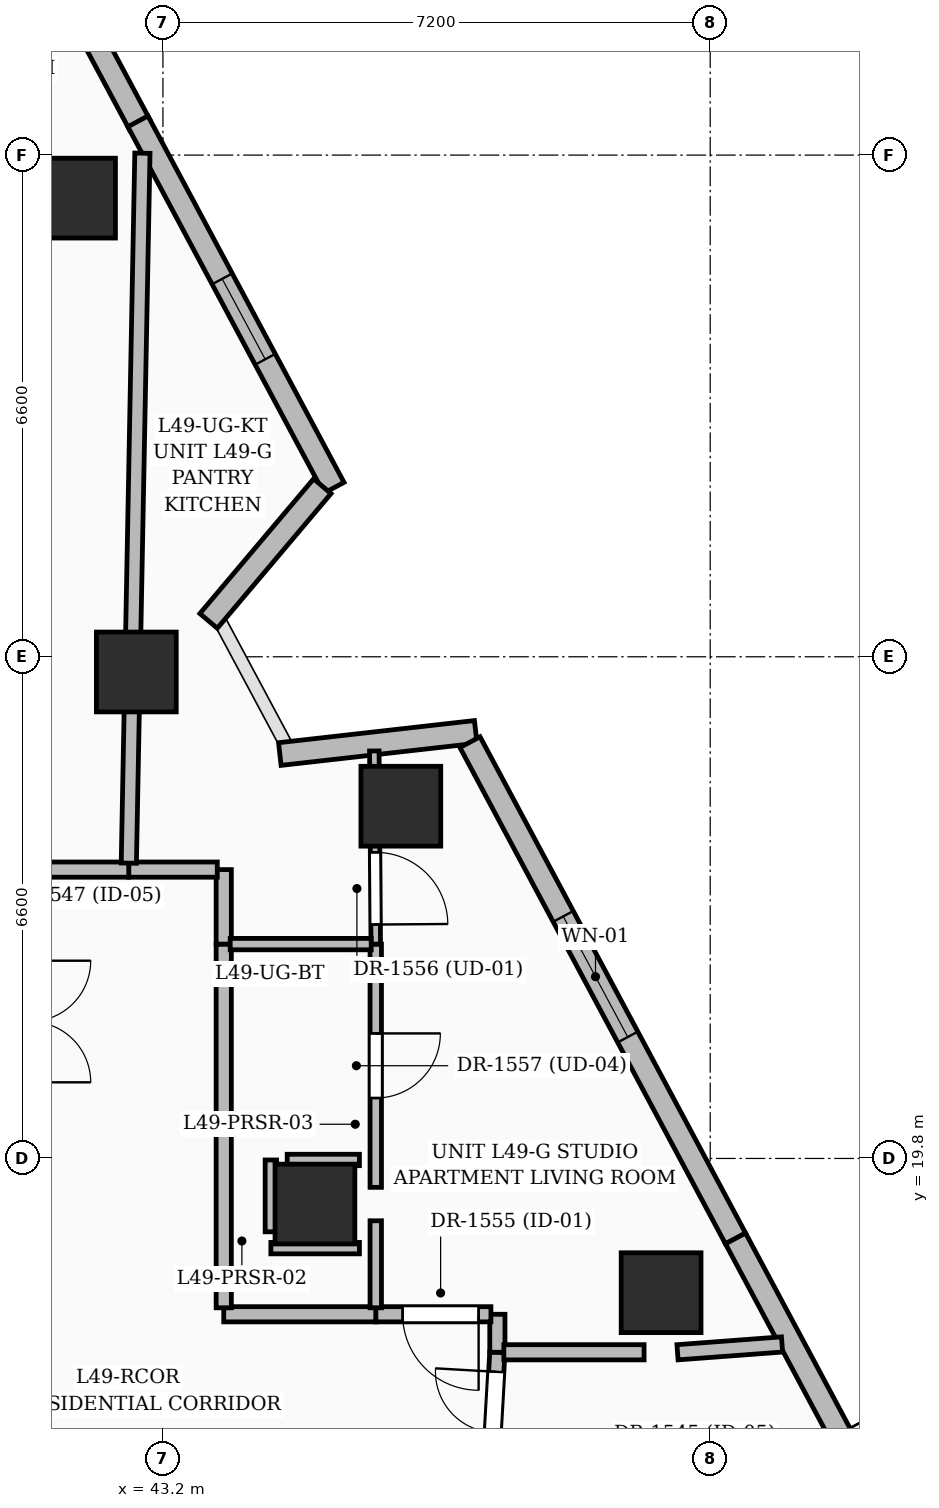
"""IFC4 building model, lengths in metres.
Left out: names, types, materials, properties, quantities, classifications, styles, units other than length and angle.
Written with IfcOpenShell. Run it as: python <this file> out.ifc"""

import sys

from ifc_helpers import new_model, si_unit, direction, frame, frame_2d, origin, origin_2d, place, context, subcontext, project, spatial, rectangle, extrude, element, fill, save


model = new_model("IFC4")
c1 = context("Model", 3, precision=1e-05, world=origin(), true_north=direction((0.0, 1.0)))
c2 = subcontext(c1, "Body", "Model", "MODEL_VIEW")
j1 = project(units=[si_unit("LENGTHUNIT", "METRE"), si_unit("PLANEANGLEUNIT", "RADIAN")], contexts=[c1])
p1 = place(None, origin())
s1 = spatial("IfcSite", under=j1, at=p1, CompositionType="ELEMENT")
p2 = place(p1, origin())
s2 = spatial("IfcBuilding", under=s1, at=p2, CompositionType="ELEMENT")
p3 = place(p2, frame((0.0, 0.0, 189.6)))
s3 = spatial("IfcBuildingStorey", under=s2, at=p3, CompositionType="ELEMENT", Elevation=189.6)
for number, where, z_axis, x_axis in (
    (1, (45.2, 19.2, 0.0), (0.0, 0.0, 1.0), (1.0, 0.0, 0.0)),
    (2, (42.85, 26.2, 0.0), (0.0, 0.0, 1.0), (1.0, 0.0, 0.0)),
    (3, (49.754, 18.034, 0.0), (0.0, 0.0, 1.0), (1.0, 0.0, 0.0)),
    (4, (46.33, 24.434, 0.0), (0.0, 0.0, 1.0), (1.0, 0.0, 0.0)),
    (5, (42.05, 32.434, 0.0), (0.0, 0.0, 1.0), (1.0, 0.0, 0.0)),
):
    element("IfcColumn", number, at=place(p3, frame(where, z_axis=z_axis, x_axis=x_axis)), inside=s3, PredefinedType="COLUMN", context=c2, shape_type="SweptSolid", body=[
        extrude(rectangle(XDim=1.05, YDim=1.05, at=origin_2d()), origin(), (0.0, 0.0, 1.0), 3.6),
    ])
p4 = place(p3, frame((40.497, 37.881, 0.0), z_axis=(0.0, 0.0, 1.0), x_axis=(0.471779002276, -0.881716832669, 0.0)))
e6 = element("IfcWall", 6, at=p4, inside=s3, PredefinedType="SOLIDWALL", context=c2, shape_type="SweptSolid", body=[
    extrude(rectangle(XDim=5.085, YDim=0.3, at=frame_2d((2.542, 0.0))), origin(), (0.0, 0.0, 1.0), 3.35),
])
p5 = place(p4, frame((1.815, 0.0, 0.6)))
e7 = element("IfcOpeningElement", 7, at=p5, cuts=e6, PredefinedType="OPENING", context=c2, shape_type="SweptSolid", body=[
    extrude(rectangle(XDim=1.5, YDim=2.1, at=frame_2d((0.75, 1.05))), frame((0.0, 0.16, 0.0), z_axis=(0.0, -1.0, 0.0), x_axis=(1.0, 0.0, 0.0)), (0.0, 0.0, 1.0), 0.32),
])
p6 = place(p3, frame((42.871, 33.444, 0.0), z_axis=(0.0, 0.0, 1.0), x_axis=(0.4717652995, -0.881724164457, 0.0)))
e8 = element("IfcWall", 8, at=p6, inside=s3, PredefinedType="SOLIDWALL", context=c2, shape_type="SweptSolid", body=[
    extrude(rectangle(XDim=5.467, YDim=0.3, at=frame_2d((2.733, 0.0))), origin(), (0.0, 0.0, 1.0), 3.35),
])
p7 = place(p6, frame((2.35, 0.0, 0.8)))
e9 = element("IfcOpeningElement", 9, at=p7, cuts=e8, PredefinedType="OPENING", context=c2, shape_type="SweptSolid", body=[
    extrude(rectangle(XDim=1.2, YDim=1.8, at=frame_2d((0.6, 0.9))), frame((0.0, 0.16, 0.0), z_axis=(0.0, -1.0, 0.0), x_axis=(1.0, 0.0, 0.0)), (0.0, 0.0, 1.0), 0.32),
])
p8 = place(p3, frame((45.297, 28.644, 0.0), z_axis=(0.0, 0.0, 1.0), x_axis=(-0.645172623399, -0.76403683551, 0.0)))
e10 = element("IfcWall", 10, at=p8, inside=s3, PredefinedType="SOLIDWALL", context=c2, shape_type="SweptSolid", body=[
    extrude(rectangle(XDim=2.319, YDim=0.3, at=frame_2d((1.159, 0.0))), origin(), (0.0, 0.0, 1.0), 2.575),
])
p9 = place(p3, frame((44.738, 25.12, 0.0), z_axis=(0.0, 0.0, 1.0), x_axis=(0.993675379704, 0.112290871269, 0.0)))
e11 = element("IfcWall", 11, at=p9, inside=s3, PredefinedType="SOLIDWALL", context=c2, shape_type="SweptSolid", body=[
    extrude(rectangle(XDim=2.594, YDim=0.3, at=frame_2d((1.297, 0.0))), origin(), (0.0, 0.0, 1.0), 2.575),
])
p10 = place(p3, frame((47.24, 25.277, 0.0), z_axis=(0.0, 0.0, 1.0), x_axis=(0.471730943247, -0.881742545862, 0.0)))
e12 = element("IfcWall", 12, at=p10, inside=s3, PredefinedType="SOLIDWALL", context=c2, shape_type="SweptSolid", body=[
    extrude(rectangle(XDim=7.405, YDim=0.3, at=frame_2d((3.703, 0.0))), origin(), (0.0, 0.0, 1.0), 3.35),
])
p11 = place(p10, frame((2.6, 0.0, 0.6)))
e13 = element("IfcOpeningElement", 13, at=p11, cuts=e12, PredefinedType="OPENING", context=c2, shape_type="SweptSolid", body=[
    extrude(rectangle(XDim=1.8, YDim=2.1, at=frame_2d((0.9, 1.05))), frame((0.0, 0.16, 0.0), z_axis=(0.0, -1.0, 0.0), x_axis=(1.0, 0.0, 0.0)), (0.0, 0.0, 1.0), 0.32),
])
p12 = place(p3, frame((50.733, 18.748, 0.0), z_axis=(0.0, 0.0, 1.0), x_axis=(0.471736169991, -0.881739749542, 0.0)))
e14 = element("IfcWall", 14, at=p12, inside=s3, PredefinedType="SOLIDWALL", context=c2, shape_type="SweptSolid", body=[
    extrude(rectangle(XDim=7.68, YDim=0.3, at=frame_2d((3.84, 0.0))), origin(), (0.0, 0.0, 1.0), 3.35),
])
p13 = place(p12, frame((5.09, 0.0, 0.0)))
e15 = element("IfcOpeningElement", 15, at=p13, cuts=e14, PredefinedType="OPENING", context=c2, shape_type="SweptSolid", body=[
    extrude(rectangle(XDim=1.0, YDim=2.2, at=frame_2d((0.5, 1.1))), frame((0.0, 0.16, 0.0), z_axis=(0.0, -1.0, 0.0), x_axis=(1.0, 0.0, 0.0)), (0.0, 0.0, 1.0), 0.32),
])
p14 = place(p3, frame((47.425, 14.2, 0.0), z_axis=(0.0, 0.0, 1.0), x_axis=(0.057297851692, 0.998357128582, 0.0)))
e16 = element("IfcWall", 16, at=p14, inside=s3, PredefinedType="PARTITIONING", context=c2, shape_type="SweptSolid", body=[
    extrude(rectangle(XDim=3.055, YDim=0.2, at=frame_2d((1.528, 0.0))), origin(), (0.0, 0.0, 1.0), 2.464),
])
p15 = place(p14, frame((1.198, 0.0, 0.0)))
e17 = element("IfcOpeningElement", 17, at=p15, cuts=e16, PredefinedType="OPENING", context=c2, shape_type="SweptSolid", body=[
    extrude(rectangle(XDim=1.6, YDim=2.3, at=frame_2d((0.8, 1.15))), frame((0.0, 0.11, 0.0), z_axis=(0.0, -1.0, 0.0), x_axis=(1.0, 0.0, 0.0)), (0.0, 0.0, 1.0), 0.22),
])
p16 = place(p3, frame((47.6, 17.25, 0.0), z_axis=(0.0, 0.0, 1.0), x_axis=(0.0, 1.0, 0.0)))
e18 = element("IfcWall", 18, at=p16, inside=s3, PredefinedType="PARTITIONING", context=c2, shape_type="SweptSolid", body=[
    extrude(rectangle(XDim=0.5, YDim=0.2, at=frame_2d((0.25, 0.0))), origin(), (0.0, 0.0, 1.0), 3.35),
])
p17 = place(p3, frame((47.515, 17.75, 0.0), z_axis=(0.0, 0.0, 1.0), x_axis=(-1.0, 0.0, 0.0)))
e19 = element("IfcWall", 19, at=p17, inside=s3, PredefinedType="PARTITIONING", context=c2, shape_type="SweptSolid", body=[
    extrude(rectangle(XDim=1.515, YDim=0.2, at=frame_2d((0.757, 0.0))), origin(), (0.0, 0.0, 1.0), 2.436),
])
p18 = place(p17, frame((0.162, 0.0, 0.0)))
e20 = element("IfcOpeningElement", 20, at=p18, cuts=e19, PredefinedType="OPENING", context=c2, shape_type="SweptSolid", body=[
    extrude(rectangle(XDim=1.0, YDim=2.2, at=frame_2d((0.5, 1.1))), frame((0.0, 0.11, 0.0), z_axis=(0.0, -1.0, 0.0), x_axis=(1.0, 0.0, 0.0)), (0.0, 0.0, 1.0), 0.22),
])
p19 = place(p3, frame((46.0, 17.75, 0.0), z_axis=(0.0, 0.0, 1.0), x_axis=(-1.0, 0.0, 0.0)))
e21 = element("IfcWall", 21, at=p19, inside=s3, PredefinedType="PARTITIONING", context=c2, shape_type="SweptSolid", body=[
    extrude(rectangle(XDim=2.0, YDim=0.2, at=frame_2d((1.0, 0.0))), origin(), (0.0, 0.0, 1.0), 2.436),
])
p20 = place(p3, frame((44.0, 17.835, 0.0), z_axis=(0.0, 0.0, 1.0), x_axis=(0.0, 1.0, 0.0)))
e22 = element("IfcWall", 22, at=p20, inside=s3, PredefinedType="PARTITIONING", context=c2, shape_type="SweptSolid", body=[
    extrude(rectangle(XDim=4.785, YDim=0.2, at=frame_2d((2.393, 0.0))), origin(), (0.0, 0.0, 1.0), 2.436),
])
p21 = place(p3, frame((44.0, 22.62, 0.0), z_axis=(0.0, 0.0, 1.0), x_axis=(0.0, 1.0, 0.0)))
e23 = element("IfcWall", 23, at=p21, inside=s3, PredefinedType="PARTITIONING", context=c2, shape_type="SweptSolid", body=[
    extrude(rectangle(XDim=0.98, YDim=0.2, at=frame_2d((0.49, 0.0))), origin(), (0.0, 0.0, 1.0), 2.436),
])
p22 = place(p3, frame((43.915, 23.6, 0.0), z_axis=(0.0, 0.0, 1.0), x_axis=(-1.0, 0.0, 0.0)))
e24 = element("IfcWall", 24, at=p22, inside=s3, PredefinedType="PARTITIONING", context=c2, shape_type="SweptSolid", body=[
    extrude(rectangle(XDim=1.165, YDim=0.2, at=frame_2d((0.583, 0.0))), origin(), (0.0, 0.0, 1.0), 2.436),
])
p23 = place(p3, frame((42.75, 23.6, 0.0), z_axis=(0.0, 0.0, 1.0), x_axis=(-1.0, 0.0, 0.0)))
e25 = element("IfcWall", 25, at=p23, inside=s3, PredefinedType="PARTITIONING", context=c2, shape_type="SweptSolid", body=[
    extrude(rectangle(XDim=1.3, YDim=0.2, at=frame_2d((0.65, 0.0))), origin(), (0.0, 0.0, 1.0), 3.35),
])
p24 = place(p3, frame((49.53, 17.25, 0.0), z_axis=(0.0, 0.0, 1.0), x_axis=(-1.0, 0.0, 0.0)))
e26 = element("IfcWall", 26, at=p24, inside=s3, PredefinedType="PARTITIONING", context=c2, shape_type="SweptSolid", body=[
    extrude(rectangle(XDim=1.845, YDim=0.2, at=frame_2d((0.922, 0.0))), origin(), (0.0, 0.0, 1.0), 2.464),
])
p25 = place(p3, frame((51.345, 17.353, 0.0), z_axis=(0.0, 0.0, 1.0), x_axis=(-0.997204589504, -0.074719520023, 0.0)))
e27 = element("IfcWall", 27, at=p25, inside=s3, PredefinedType="PARTITIONING", context=c2, shape_type="SweptSolid", body=[
    extrude(rectangle(XDim=1.379, YDim=0.2, at=frame_2d((0.689, 0.0))), origin(), (0.0, 0.0, 1.0), 2.57),
])
p26 = place(p3, frame((46.0, 18.98, 0.0), z_axis=(0.0, 0.0, 1.0), x_axis=(0.0, -1.0, 0.0)))
e28 = element("IfcWall", 28, at=p26, inside=s3, PredefinedType="PARTITIONING", context=c2, shape_type="SweptSolid", body=[
    extrude(rectangle(XDim=1.145, YDim=0.15, at=frame_2d((0.573, 0.0))), origin(), (0.0, 0.0, 1.0), 2.436),
])
p27 = place(p3, frame((46.0, 22.62, 0.0), z_axis=(0.0, 0.0, 1.0), x_axis=(0.0, -1.0, 0.0)))
e29 = element("IfcWall", 29, at=p27, inside=s3, PredefinedType="PARTITIONING", context=c2, shape_type="SweptSolid", body=[
    extrude(rectangle(XDim=3.2, YDim=0.15, at=frame_2d((1.6, 0.0))), origin(), (0.0, 0.0, 1.0), 2.464),
])
p28 = place(p27, frame((1.175, 0.0, 0.0)))
e30 = element("IfcOpeningElement", 30, at=p28, cuts=e29, PredefinedType="OPENING", context=c2, shape_type="SweptSolid", body=[
    extrude(rectangle(XDim=0.85, YDim=2.1, at=frame_2d((0.425, 1.05))), frame((0.0, 0.085, 0.0), z_axis=(0.0, -1.0, 0.0), x_axis=(1.0, 0.0, 0.0)), (0.0, 0.0, 1.0), 0.17),
])
p29 = place(p3, frame((45.981, 25.161, 0.0), z_axis=(0.0, 0.0, 1.0), x_axis=(0.007494744815, -0.999971914006, 0.0)))
e31 = element("IfcWall", 31, at=p29, inside=s3, PredefinedType="PARTITIONING", context=c2, shape_type="SweptSolid", body=[
    extrude(rectangle(XDim=2.541, YDim=0.125, at=frame_2d((1.271, 0.0))), origin(), (0.0, 0.0, 1.0), 2.464),
])
p30 = place(p29, frame((1.334, 0.0, 0.0)))
e32 = element("IfcOpeningElement", 32, at=p30, cuts=e31, PredefinedType="OPENING", context=c2, shape_type="SweptSolid", body=[
    extrude(rectangle(XDim=0.95, YDim=2.2, at=frame_2d((0.475, 1.1))), frame((0.0, 0.072, 0.0), z_axis=(0.0, -1.0, 0.0), x_axis=(1.0, 0.0, 0.0)), (0.0, 0.0, 1.0), 0.145),
])
p31 = place(p3, frame((45.94, 22.62, 0.0), z_axis=(0.0, 0.0, 1.0), x_axis=(-1.0, 0.0, 0.0)))
e33 = element("IfcWall", 33, at=p31, inside=s3, PredefinedType="PARTITIONING", context=c2, shape_type="SweptSolid", body=[
    extrude(rectangle(XDim=1.855, YDim=0.15, at=frame_2d((0.927, 0.0))), origin(), (0.0, 0.0, 1.0), 2.436),
])
p32 = place(p3, frame((42.93, 33.025, 0.0), z_axis=(0.0, 0.0, 1.0), x_axis=(-0.019130751699, -0.999816990423, 0.0)))
e34 = element("IfcWall", 34, at=p32, inside=s3, PredefinedType="PARTITIONING", context=c2, shape_type="SweptSolid", body=[
    extrude(rectangle(XDim=9.342, YDim=0.2, at=frame_2d((4.671, 0.0))), origin(), (0.0, 0.0, 1.0), 2.436),
])
p33 = place(p3, frame((45.785, 18.62, 0.0), z_axis=(0.0, 0.0, 1.0), x_axis=(-1.0, 0.0, 0.0)))
e35 = element("IfcWall", 35, at=p33, inside=s3, PredefinedType="PARTITIONING", context=c2, shape_type="SweptSolid", body=[
    extrude(rectangle(XDim=1.165, YDim=0.15, at=frame_2d((0.583, 0.0))), origin(), (0.0, 0.0, 1.0), 2.436),
])
p34 = place(p3, frame((44.62, 18.835, 0.0), z_axis=(0.0, 0.0, 1.0), x_axis=(0.0, 1.0, 0.0)))
e36 = element("IfcWall", 36, at=p34, inside=s3, PredefinedType="PARTITIONING", context=c2, shape_type="SweptSolid", body=[
    extrude(rectangle(XDim=0.945, YDim=0.15, at=frame_2d((0.473, 0.0))), origin(), (0.0, 0.0, 1.0), 2.853),
])
p35 = place(p3, frame((44.835, 19.78, 0.0), z_axis=(0.0, 0.0, 1.0), x_axis=(1.0, 0.0, 0.0)))
e37 = element("IfcWall", 37, at=p35, inside=s3, PredefinedType="PARTITIONING", context=c2, shape_type="SweptSolid", body=[
    extrude(rectangle(XDim=0.95, YDim=0.15, at=frame_2d((0.475, 0.0))), origin(), (0.0, 0.0, 1.0), 2.436),
])
p36 = place(p7, origin())
e38 = element("IfcWindow", 38, at=p36, inside=s3, PartitioningType="SINGLE_PANEL", PredefinedType="WINDOW", context=c2, shape_type="SweptSolid", body=[
    extrude(rectangle(XDim=1.2, YDim=1.8, at=frame_2d((0.6, 0.9))), frame((0.0, 0.03, 0.0), z_axis=(0.0, -1.0, 0.0), x_axis=(1.0, 0.0, 0.0)), (0.0, 0.0, 1.0), 0.06),
])
fill(e9, e38)
p37 = place(p11, origin())
e39 = element("IfcWindow", 39, at=p37, inside=s3, PartitioningType="SINGLE_PANEL", PredefinedType="WINDOW", context=c2, shape_type="SweptSolid", body=[
    extrude(rectangle(XDim=1.8, YDim=2.1, at=frame_2d((0.9, 1.05))), frame((0.0, 0.03, 0.0), z_axis=(0.0, -1.0, 0.0), x_axis=(1.0, 0.0, 0.0)), (0.0, 0.0, 1.0), 0.06),
])
fill(e13, e39)
p38 = place(p15, origin())
e40 = element("IfcDoor", 40, at=p38, inside=s3, OperationType="DOUBLE_DOOR_SINGLE_SWING", PredefinedType="DOOR", context=c2, shape_type="SweptSolid", body=[
    extrude(rectangle(XDim=1.6, YDim=2.3, at=frame_2d((0.8, 1.15))), frame((0.0, 0.025, 0.0), z_axis=(0.0, -1.0, 0.0), x_axis=(1.0, 0.0, 0.0)), (0.0, 0.0, 1.0), 0.05),
])
fill(e17, e40)
p39 = place(p18, origin())
e41 = element("IfcDoor", 41, at=p39, inside=s3, OperationType="SINGLE_SWING_LEFT", PredefinedType="DOOR", context=c2, shape_type="SweptSolid", body=[
    extrude(rectangle(XDim=1.0, YDim=2.2, at=frame_2d((0.5, 1.1))), frame((0.0, 0.025, 0.0), z_axis=(0.0, -1.0, 0.0), x_axis=(1.0, 0.0, 0.0)), (0.0, 0.0, 1.0), 0.05),
])
fill(e20, e41)
p40 = place(p30, origin())
e42 = element("IfcDoor", 42, at=p40, inside=s3, OperationType="SINGLE_SWING_RIGHT", PredefinedType="DOOR", context=c2, shape_type="SweptSolid", body=[
    extrude(rectangle(XDim=0.95, YDim=2.2, at=frame_2d((0.475, 1.1))), frame((0.0, 0.025, 0.0), z_axis=(0.0, -1.0, 0.0), x_axis=(1.0, 0.0, 0.0)), (0.0, 0.0, 1.0), 0.05),
])
fill(e32, e42)
p41 = place(p28, origin())
e43 = element("IfcDoor", 43, at=p41, inside=s3, OperationType="SINGLE_SWING_LEFT", PredefinedType="DOOR", context=c2, shape_type="SweptSolid", body=[
    extrude(rectangle(XDim=0.85, YDim=2.1, at=frame_2d((0.425, 1.05))), frame((0.0, 0.025, 0.0), z_axis=(0.0, -1.0, 0.0), x_axis=(1.0, 0.0, 0.0)), (0.0, 0.0, 1.0), 0.05),
])
fill(e30, e43)
save(model, sys.argv[1])
